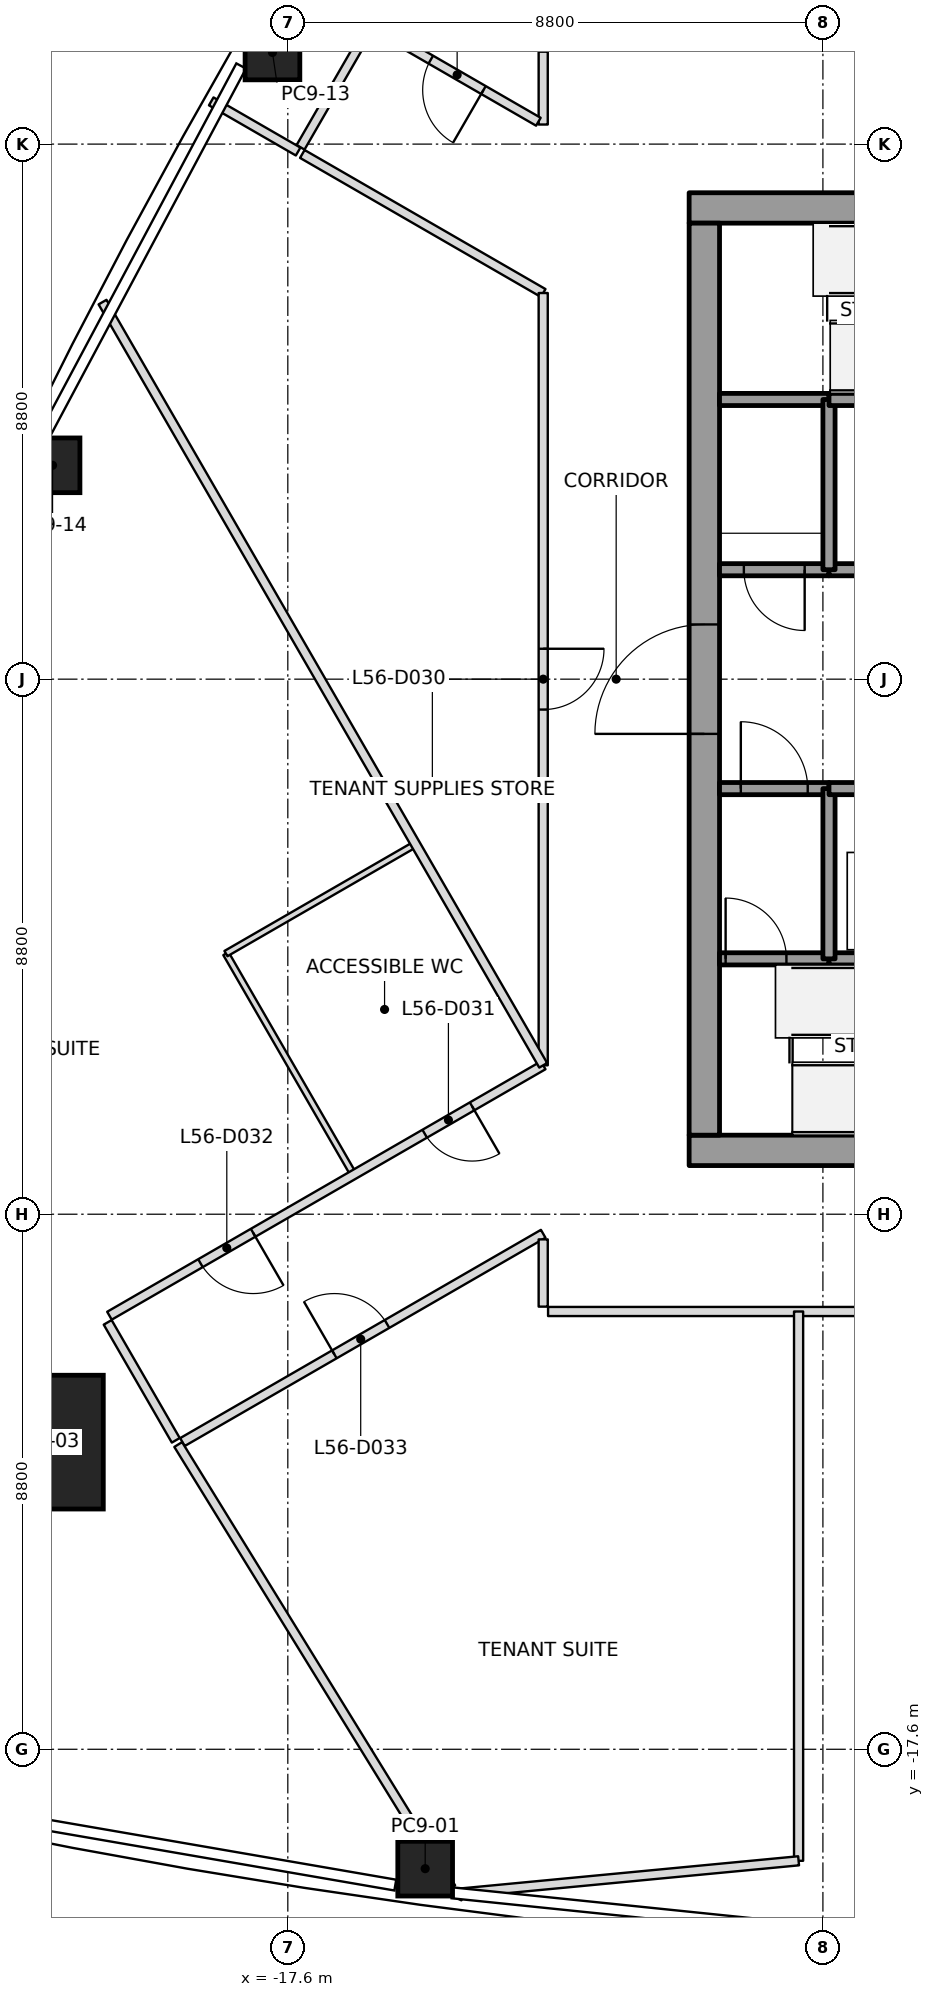
"""IFC4 building model, lengths in metres.
Left out: names, types, materials, properties, quantities, classifications, styles, units other than length and angle.
Written with IfcOpenShell. Run it as: python <this file> out.ifc"""

import sys

from ifc_helpers import new_model, si_unit, direction, frame, frame_2d, origin, origin_2d, place, context, subcontext, project, spatial, rectangle, extrude, element, fill, save


model = new_model("IFC4")
c1 = context("Model", 3, precision=1e-05, world=origin(), true_north=direction((0.0, 1.0)))
c2 = subcontext(c1, "Body", "Model", "MODEL_VIEW")
j1 = project(units=[si_unit("LENGTHUNIT", "METRE"), si_unit("PLANEANGLEUNIT", "RADIAN")], contexts=[c1])
p1 = place(None, origin())
s1 = spatial("IfcSite", under=j1, at=p1, CompositionType="ELEMENT")
p2 = place(p1, origin())
s2 = spatial("IfcBuilding", under=s1, at=p2, CompositionType="ELEMENT")
p3 = place(p2, frame((0.0, 0.0, 251.0)))
s3 = spatial("IfcBuildingStorey", under=s2, at=p3, CompositionType="ELEMENT", Elevation=251.0)
p4 = place(p3, frame((-21.735, -12.549, 0.0), z_axis=(0.027817649629, 0.016104955049, 0.999483270892), x_axis=(0.999613014306, -0.000448175434, -0.027814039075)))
e1 = element("IfcColumn", 1, at=p4, inside=s3, PredefinedType="COLUMN", context=c2, shape_type="SweptSolid", body=[
    extrude(rectangle(XDim=2.2, YDim=2.2, at=origin_2d()), origin(), (0.0, 0.0, 1.0), 4.002),
])
p5 = place(p3, frame((-15.341, -19.564, 0.0), z_axis=(0.017513449354, 0.010434842647, 0.99979217498), x_axis=(-0.990510670136, 0.136509968216, 0.015926108262)))
e2 = element("IfcColumn", 2, at=p5, inside=s3, PredefinedType="COLUMN", context=c2, shape_type="SweptSolid", body=[
    extrude(rectangle(XDim=0.9, YDim=0.9, at=origin_2d()), origin(), (0.0, 0.0, 1.0), 4.001),
])
p6 = place(p3, frame((-17.853, 10.307, 0.0), z_axis=(0.009887049298, -0.00573692984, 0.999934664812), x_axis=(0.499975560967, 0.866039512843, 2.5126546e-05)))
e3 = element("IfcColumn", 3, at=p6, inside=s3, PredefinedType="COLUMN", context=c2, shape_type="SweptSolid", body=[
    extrude(rectangle(XDim=0.9, YDim=0.9, at=origin_2d()), origin(), (0.0, 0.0, 1.0), 4.0),
])
p7 = place(p3, frame((-21.469, 3.517, 0.0), z_axis=(0.014036674448, 0.002013957638, 0.999899452818), x_axis=(0.439615277351, 0.898150723159, -0.007980376444)))
e4 = element("IfcColumn", 4, at=p7, inside=s3, PredefinedType="COLUMN", context=c2, shape_type="SweptSolid", body=[
    extrude(rectangle(XDim=0.9, YDim=0.9, at=origin_2d()), origin(), (0.0, 0.0, 1.0), 4.0),
])
p8 = place(p3, frame((-11.0, -7.75, 0.0), z_axis=(0.0, 0.0, 1.0), x_axis=(1.0, 0.0, 0.0)))
e5 = element("IfcWall", 5, at=p8, inside=s3, PredefinedType="SHEAR", context=c2, shape_type="SweptSolid", body=[
    extrude(rectangle(XDim=22.0, YDim=0.5, at=frame_2d((11.0, 0.0))), origin(), (0.0, 0.0, 1.0), 4.0),
])
p9 = place(p8, frame((10.45, 0.0, 0.0)))
e6 = element("IfcOpeningElement", 6, at=p9, cuts=e5, PredefinedType="OPENING", context=c2, shape_type="SweptSolid", body=[
    extrude(rectangle(XDim=1.1, YDim=2.1, at=frame_2d((0.55, 1.05))), frame((0.0, 0.25, 0.0), z_axis=(0.0, -1.0, 0.0), x_axis=(1.0, 0.0, 0.0)), (0.0, 0.0, 1.0), 0.5),
])
p10 = place(p3, frame((-11.0, 7.75, 0.0), z_axis=(0.0, 0.0, 1.0), x_axis=(1.0, 0.0, 0.0)))
e7 = element("IfcWall", 7, at=p10, inside=s3, PredefinedType="SHEAR", context=c2, shape_type="SweptSolid", body=[
    extrude(rectangle(XDim=22.0, YDim=0.5, at=frame_2d((11.0, 0.0))), origin(), (0.0, 0.0, 1.0), 4.0),
])
p11 = place(p10, frame((10.45, 0.0, 0.0)))
e8 = element("IfcOpeningElement", 8, at=p11, cuts=e7, PredefinedType="OPENING", context=c2, shape_type="SweptSolid", body=[
    extrude(rectangle(XDim=1.1, YDim=2.1, at=frame_2d((0.55, 1.05))), frame((0.0, 0.25, 0.0), z_axis=(0.0, -1.0, 0.0), x_axis=(1.0, 0.0, 0.0)), (0.0, 0.0, 1.0), 0.5),
])
p12 = place(p3, frame((-10.75, -7.5, 0.0), z_axis=(0.0, 0.0, 1.0), x_axis=(0.0, 1.0, 0.0)))
e9 = element("IfcWall", 9, at=p12, inside=s3, PredefinedType="SHEAR", context=c2, shape_type="SweptSolid", body=[
    extrude(rectangle(XDim=15.0, YDim=0.5, at=frame_2d((7.5, 0.0))), origin(), (0.0, 0.0, 1.0), 4.0),
])
p13 = place(p12, frame((6.6, 0.0, 0.0)))
e10 = element("IfcOpeningElement", 10, at=p13, cuts=e9, PredefinedType="OPENING", context=c2, shape_type="SweptSolid", body=[
    extrude(rectangle(XDim=1.8, YDim=2.1, at=frame_2d((0.9, 1.05))), frame((0.0, 0.25, 0.0), z_axis=(0.0, -1.0, 0.0), x_axis=(1.0, 0.0, 0.0)), (0.0, 0.0, 1.0), 0.5),
])
p14 = place(p3, frame((-10.5, -4.6, 0.0), z_axis=(0.0, 0.0, 1.0), x_axis=(1.0, 0.0, 0.0)))
e11 = element("IfcWall", 11, at=p14, inside=s3, PredefinedType="SOLIDWALL", context=c2, shape_type="SweptSolid", body=[
    extrude(rectangle(XDim=1.8, YDim=0.2, at=frame_2d((0.9, 0.0))), origin(), (0.0, 0.0, 1.0), 3.85),
])
p15 = place(p14, frame((0.1, 0.0, 0.0)))
e12 = element("IfcOpeningElement", 12, at=p15, cuts=e11, PredefinedType="OPENING", context=c2, shape_type="SweptSolid", body=[
    extrude(rectangle(XDim=1.0, YDim=2.1, at=frame_2d((0.5, 1.05))), frame((0.0, 0.1, 0.0), z_axis=(0.0, -1.0, 0.0), x_axis=(1.0, 0.0, 0.0)), (0.0, 0.0, 1.0), 0.2),
])
p16 = place(p3, frame((-10.5, -1.8, 0.0), z_axis=(0.0, 0.0, 1.0), x_axis=(1.0, 0.0, 0.0)))
e13 = element("IfcWall", 13, at=p16, inside=s3, PredefinedType="SOLIDWALL", context=c2, shape_type="SweptSolid", body=[
    extrude(rectangle(XDim=1.8, YDim=0.2, at=frame_2d((0.9, 0.0))), origin(), (0.0, 0.0, 1.0), 3.85),
])
p17 = place(p16, frame((0.35, 0.0, 0.0)))
e14 = element("IfcOpeningElement", 14, at=p17, cuts=e13, PredefinedType="OPENING", context=c2, shape_type="SweptSolid", body=[
    extrude(rectangle(XDim=1.1, YDim=2.1, at=frame_2d((0.55, 1.05))), frame((0.0, 0.1, 0.0), z_axis=(0.0, -1.0, 0.0), x_axis=(1.0, 0.0, 0.0)), (0.0, 0.0, 1.0), 0.2),
])
p18 = place(p3, frame((-8.7, 1.8, 0.0), z_axis=(0.0, 0.0, 1.0), x_axis=(-1.0, 0.0, 0.0)))
e15 = element("IfcWall", 15, at=p18, inside=s3, PredefinedType="SOLIDWALL", context=c2, shape_type="SweptSolid", body=[
    extrude(rectangle(XDim=1.8, YDim=0.2, at=frame_2d((0.9, 0.0))), origin(), (0.0, 0.0, 1.0), 3.85),
])
p19 = place(p18, frame((0.4, 0.0, 0.0)))
e16 = element("IfcOpeningElement", 16, at=p19, cuts=e15, PredefinedType="OPENING", context=c2, shape_type="SweptSolid", body=[
    extrude(rectangle(XDim=1.0, YDim=2.1, at=frame_2d((0.5, 1.05))), frame((0.0, 0.1, 0.0), z_axis=(0.0, -1.0, 0.0), x_axis=(1.0, 0.0, 0.0)), (0.0, 0.0, 1.0), 0.2),
])
p20 = place(p3, frame((-8.7, 4.6, 0.0), z_axis=(0.0, 0.0, 1.0), x_axis=(-1.0, 0.0, 0.0)))
e17 = element("IfcWall", 17, at=p20, inside=s3, PredefinedType="SOLIDWALL", context=c2, shape_type="SweptSolid", body=[
    extrude(rectangle(XDim=1.8, YDim=0.2, at=frame_2d((0.9, 0.0))), origin(), (0.0, 0.0, 1.0), 3.85),
])
p21 = place(p3, frame((-8.7, -4.6, 0.0), z_axis=(0.0, 0.0, 1.0), x_axis=(1.0, 0.0, 0.0)))
e18 = element("IfcWall", 18, at=p21, inside=s3, PredefinedType="SOLIDWALL", context=c2, shape_type="SweptSolid", body=[
    extrude(rectangle(XDim=2.6, YDim=0.2, at=frame_2d((1.3, 0.0))), origin(), (0.0, 0.0, 1.0), 3.85),
])
p22 = place(p3, frame((-8.7, -4.6, 0.0), z_axis=(0.0, 0.0, 1.0), x_axis=(0.0, 1.0, 0.0)))
e19 = element("IfcWall", 19, at=p22, inside=s3, PredefinedType="SOLIDWALL", context=c2, shape_type="SweptSolid", body=[
    extrude(rectangle(XDim=2.8, YDim=0.2, at=frame_2d((1.4, 0.0))), origin(), (0.0, 0.0, 1.0), 3.85),
])
p23 = place(p3, frame((-8.7, -1.8, 0.0), z_axis=(0.0, 0.0, 1.0), x_axis=(1.0, 0.0, 0.0)))
e20 = element("IfcWall", 20, at=p23, inside=s3, PredefinedType="SOLIDWALL", context=c2, shape_type="SweptSolid", body=[
    extrude(rectangle(XDim=2.6, YDim=0.2, at=frame_2d((1.3, 0.0))), origin(), (0.0, 0.0, 1.0), 3.85),
])
p24 = place(p23, frame((0.75, 0.0, 0.0)))
e21 = element("IfcOpeningElement", 21, at=p24, cuts=e20, PredefinedType="OPENING", context=c2, shape_type="SweptSolid", body=[
    extrude(rectangle(XDim=1.1, YDim=2.1, at=frame_2d((0.55, 1.05))), frame((0.0, 0.1, 0.0), z_axis=(0.0, -1.0, 0.0), x_axis=(1.0, 0.0, 0.0)), (0.0, 0.0, 1.0), 0.2),
])
p25 = place(p3, frame((-8.7, 1.8, 0.0), z_axis=(0.0, 0.0, 1.0), x_axis=(1.0, 0.0, 0.0)))
e22 = element("IfcWall", 22, at=p25, inside=s3, PredefinedType="SOLIDWALL", context=c2, shape_type="SweptSolid", body=[
    extrude(rectangle(XDim=5.2, YDim=0.2, at=frame_2d((2.6, 0.0))), origin(), (0.0, 0.0, 1.0), 3.85),
])
p26 = place(p25, frame((2.15, 0.0, 0.0)))
e23 = element("IfcOpeningElement", 23, at=p26, cuts=e22, PredefinedType="OPENING", context=c2, shape_type="SweptSolid", body=[
    extrude(rectangle(XDim=0.9, YDim=2.1, at=frame_2d((0.45, 1.05))), frame((0.0, 0.1, 0.0), z_axis=(0.0, -1.0, 0.0), x_axis=(1.0, 0.0, 0.0)), (0.0, 0.0, 1.0), 0.2),
])
p27 = place(p3, frame((-8.7, 4.6, 0.0), z_axis=(0.0, 0.0, 1.0), x_axis=(0.0, -1.0, 0.0)))
e24 = element("IfcWall", 24, at=p27, inside=s3, PredefinedType="SOLIDWALL", context=c2, shape_type="SweptSolid", body=[
    extrude(rectangle(XDim=2.8, YDim=0.2, at=frame_2d((1.4, 0.0))), origin(), (0.0, 0.0, 1.0), 3.85),
])
p28 = place(p3, frame((-4.3, 4.6, 0.0), z_axis=(0.0, 0.0, 1.0), x_axis=(-1.0, 0.0, 0.0)))
e25 = element("IfcWall", 25, at=p28, inside=s3, PredefinedType="SOLIDWALL", context=c2, shape_type="SweptSolid", body=[
    extrude(rectangle(XDim=4.4, YDim=0.2, at=frame_2d((2.2, 0.0))), origin(), (0.0, 0.0, 1.0), 3.85),
])
p29 = place(p3, frame((-13.4, -6.351, 0.0), z_axis=(0.0, 0.0, 1.0), x_axis=(-0.500014063744, 0.866017283926, 0.0)))
e26 = element("IfcWall", 26, at=p29, inside=s3, PredefinedType="PARTITIONING", context=c2, shape_type="SweptSolid", body=[
    extrude(rectangle(XDim=14.494, YDim=0.15, at=frame_2d((7.247, 0.0))), origin(), (0.0, 0.0, 1.0), 3.234),
])
p30 = place(p3, frame((-19.403, -12.588, 0.0), z_axis=(0.0, 0.0, 1.0), x_axis=(0.524407622251, -0.851467348596, 0.0)))
e27 = element("IfcWall", 27, at=p30, inside=s3, PredefinedType="PARTITIONING", context=c2, shape_type="SweptSolid", body=[
    extrude(rectangle(XDim=8.562, YDim=0.15, at=frame_2d((4.281, 0.0))), origin(), (0.0, 0.0, 1.0), 3.45),
])
p31 = place(p3, frame((-17.431, 8.678, 0.0), z_axis=(0.0, 0.0, 1.0), x_axis=(-0.866067297121, 0.499927431592, 0.0)))
e28 = element("IfcWall", 28, at=p31, inside=s3, PredefinedType="PARTITIONING", context=c2, shape_type="SweptSolid", body=[
    extrude(rectangle(XDim=1.65, YDim=0.15, at=frame_2d((0.825, 0.0))), origin(), (0.0, 0.0, 1.0), 3.234),
])
p32 = place(p3, frame((-9.2, -10.4, 0.0), z_axis=(0.0, 0.0, 1.0), x_axis=(0.0, -1.0, 0.0)))
e29 = element("IfcWall", 29, at=p32, inside=s3, PredefinedType="PARTITIONING", context=c2, shape_type="SweptSolid", body=[
    extrude(rectangle(XDim=9.034, YDim=0.15, at=frame_2d((4.517, 0.0))), origin(), (0.0, 0.0, 1.0), 3.45),
])
p33 = place(p3, frame((-9.2, -19.434, 0.0), z_axis=(0.0, 0.0, 1.0), x_axis=(-0.995486828172, -0.094899815256, 0.0)))
e30 = element("IfcWall", 30, at=p33, inside=s3, PredefinedType="PARTITIONING", context=c2, shape_type="SweptSolid", body=[
    extrude(rectangle(XDim=5.588, YDim=0.15, at=frame_2d((2.794, 0.0))), origin(), (0.0, 0.0, 1.0), 3.234),
])
p34 = place(p3, frame((-14.812, -20.051, 0.0), z_axis=(0.0, 0.0, 1.0), x_axis=(0.448990893469, 0.893536332547, 0.0)))
e31 = element("IfcWall", 31, at=p34, inside=s3, PredefinedType="PARTITIONING", context=c2, shape_type="SweptSolid", body=[
    extrude(rectangle(XDim=0.11, YDim=0.15, at=frame_2d((0.055, 0.0))), origin(), (0.0, 0.0, 1.0), 3.45),
])
p35 = place(p3, frame((-20.562, -10.579, 0.0), z_axis=(0.0, 0.0, 1.0), x_axis=(0.49994888933, -0.866054910533, 0.0)))
e32 = element("IfcWall", 32, at=p35, inside=s3, PredefinedType="PARTITIONING", context=c2, shape_type="SweptSolid", body=[
    extrude(rectangle(XDim=2.24, YDim=0.15, at=frame_2d((1.12, 0.0))), origin(), (0.0, 0.0, 1.0), 3.233),
])
p36 = place(p3, frame((-13.4, -6.351, 0.0), z_axis=(0.0, 0.0, 1.0), x_axis=(-0.866025662596, -0.499999551726, 0.0)))
e33 = element("IfcWall", 33, at=p36, inside=s3, PredefinedType="PARTITIONING", context=c2, shape_type="SweptSolid", body=[
    extrude(rectangle(XDim=8.237, YDim=0.15, at=frame_2d((4.118, 0.0))), origin(), (0.0, 0.0, 1.0), 3.317),
])
p37 = place(p36, frame((1.35, 0.0, 0.0)))
e34 = element("IfcOpeningElement", 34, at=p37, cuts=e33, PredefinedType="OPENING", context=c2, shape_type="SweptSolid", body=[
    extrude(rectangle(XDim=0.9, YDim=2.1, at=frame_2d((0.45, 1.05))), frame((0.0, 0.075, 0.0), z_axis=(0.0, -1.0, 0.0), x_axis=(1.0, 0.0, 0.0)), (0.0, 0.0, 1.0), 0.15),
])
p38 = place(p36, frame((5.509, 0.0, 0.0)))
e35 = element("IfcOpeningElement", 35, at=p38, cuts=e33, PredefinedType="OPENING", context=c2, shape_type="SweptSolid", body=[
    extrude(rectangle(XDim=1.0, YDim=2.1, at=frame_2d((0.5, 1.05))), frame((0.0, 0.075, 0.0), z_axis=(0.0, -1.0, 0.0), x_axis=(1.0, 0.0, 0.0)), (0.0, 0.0, 1.0), 0.15),
])
p39 = place(p3, frame((-19.333, -12.548, 0.0), z_axis=(0.0, 0.0, 1.0), x_axis=(0.866030705461, 0.499990817114, 0.0)))
e36 = element("IfcWall", 36, at=p39, inside=s3, PredefinedType="PARTITIONING", context=c2, shape_type="SweptSolid", body=[
    extrude(rectangle(XDim=6.851, YDim=0.15, at=frame_2d((3.426, 0.0))), origin(), (0.0, 0.0, 1.0), 3.233),
])
p40 = place(p39, frame((2.885, 0.0, 0.0)))
e37 = element("IfcOpeningElement", 37, at=p40, cuts=e36, PredefinedType="OPENING", context=c2, shape_type="SweptSolid", body=[
    extrude(rectangle(XDim=1.0, YDim=2.1, at=frame_2d((0.5, 1.05))), frame((0.0, 0.075, 0.0), z_axis=(0.0, -1.0, 0.0), x_axis=(1.0, 0.0, 0.0)), (0.0, 0.0, 1.0), 0.15),
])
p41 = place(p3, frame((-13.4, -9.214, 0.0), z_axis=(0.0, 0.0, 1.0), x_axis=(0.0, -1.0, 0.0)))
e38 = element("IfcWall", 38, at=p41, inside=s3, PredefinedType="PARTITIONING", context=c2, shape_type="SweptSolid", body=[
    extrude(rectangle(XDim=1.106, YDim=0.15, at=frame_2d((0.553, 0.0))), origin(), (0.0, 0.0, 1.0), 3.233),
])
p42 = place(p3, frame((-16.271, 10.687, 0.0), z_axis=(0.0, 0.0, 1.0), x_axis=(-0.500077830873, -0.865980463445, 0.0)))
e39 = element("IfcWall", 39, at=p42, inside=s3, PredefinedType="PARTITIONING", context=c2, shape_type="SweptSolid", body=[
    extrude(rectangle(XDim=2.24, YDim=0.15, at=frame_2d((1.12, 0.0))), origin(), (0.0, 0.0, 1.0), 3.45),
])
p43 = place(p3, frame((-17.361, 8.638, 0.0), z_axis=(0.0, 0.0, 1.0), x_axis=(0.866027379035, -0.49999657875, 0.0)))
e40 = element("IfcWall", 40, at=p43, inside=s3, PredefinedType="PARTITIONING", context=c2, shape_type="SweptSolid", body=[
    extrude(rectangle(XDim=4.574, YDim=0.15, at=frame_2d((2.287, 0.0))), origin(), (0.0, 0.0, 1.0), 3.45),
])
p44 = place(p3, frame((-13.4, 6.351, 0.0), z_axis=(0.0, 0.0, 1.0), x_axis=(0.0, -1.0, 0.0)))
e41 = element("IfcWall", 41, at=p44, inside=s3, PredefinedType="PARTITIONING", context=c2, shape_type="SweptSolid", body=[
    extrude(rectangle(XDim=12.702, YDim=0.15, at=frame_2d((6.351, 0.0))), origin(), (0.0, 0.0, 1.0), 3.317),
])
p45 = place(p44, frame((5.851, 0.0, 0.0)))
e42 = element("IfcOpeningElement", 42, at=p45, cuts=e41, PredefinedType="OPENING", context=c2, shape_type="SweptSolid", body=[
    extrude(rectangle(XDim=1.0, YDim=2.1, at=frame_2d((0.5, 1.05))), frame((0.0, 0.075, 0.0), z_axis=(0.0, -1.0, 0.0), x_axis=(1.0, 0.0, 0.0)), (0.0, 0.0, 1.0), 0.15),
])
p46 = place(p3, frame((-13.4, 10.32, 0.0), z_axis=(0.0, 0.0, 1.0), x_axis=(0.0, -1.0, 0.0)))
e43 = element("IfcWall", 43, at=p46, inside=s3, PredefinedType="PARTITIONING", context=c2, shape_type="SweptSolid", body=[
    extrude(rectangle(XDim=1.198, YDim=0.15, at=frame_2d((0.599, 0.0))), origin(), (0.0, 0.0, 1.0), 3.45),
])
p47 = place(p3, frame((-13.479, 9.168, 0.0), z_axis=(0.0, 0.0, 1.0), x_axis=(-0.866051688794, 0.499954470265, 0.0)))
e44 = element("IfcWall", 44, at=p47, inside=s3, PredefinedType="PARTITIONING", context=c2, shape_type="SweptSolid", body=[
    extrude(rectangle(XDim=3.097, YDim=0.15, at=frame_2d((1.548, 0.0))), origin(), (0.0, 0.0, 1.0), 3.45),
])
p48 = place(p47, frame((1.043, 0.0, 0.0)))
e45 = element("IfcOpeningElement", 45, at=p48, cuts=e44, PredefinedType="OPENING", context=c2, shape_type="SweptSolid", body=[
    extrude(rectangle(XDim=1.0, YDim=2.1, at=frame_2d((0.5, 1.05))), frame((0.0, 0.075, 0.0), z_axis=(0.0, -1.0, 0.0), x_axis=(1.0, 0.0, 0.0)), (0.0, 0.0, 1.0), 0.15),
])
p49 = place(p3, frame((-13.32, -10.4, 0.0), z_axis=(0.0, 0.0, 1.0), x_axis=(1.0, 0.0, 0.0)))
e46 = element("IfcWall", 46, at=p49, inside=s3, PredefinedType="PARTITIONING", context=c2, shape_type="SweptSolid", body=[
    extrude(rectangle(XDim=12.12, YDim=0.15, at=frame_2d((6.06, 0.0))), origin(), (0.0, 0.0, 1.0), 3.317),
])
p50 = place(p3, frame((-16.533, -8.125, 0.0), z_axis=(0.0, 0.0, 1.0), x_axis=(-0.499967396439, 0.866044226641, 0.0)))
e47 = element("IfcWall", 47, at=p50, inside=s3, PredefinedType="PARTITIONING", context=c2, shape_type="SweptSolid", body=[
    extrude(rectangle(XDim=4.17, YDim=0.1, at=frame_2d((2.085, 0.0))), origin(), (0.0, 0.0, 1.0), 3.317),
])
p51 = place(p3, frame((-18.618, -4.513, 0.0), z_axis=(0.0, 0.0, 1.0), x_axis=(0.866042098853, 0.499971082179, 0.0)))
e48 = element("IfcWall", 48, at=p51, inside=s3, PredefinedType="PARTITIONING", context=c2, shape_type="SweptSolid", body=[
    extrude(rectangle(XDim=3.57, YDim=0.1, at=frame_2d((1.785, 0.0))), origin(), (0.0, 0.0, 1.0), 3.317),
])
p52 = place(p48, origin())
e49 = element("IfcDoor", 49, at=p52, inside=s3, OperationType="SINGLE_SWING_RIGHT", PredefinedType="DOOR", context=c2, shape_type="SweptSolid", body=[
    extrude(rectangle(XDim=1.0, YDim=2.1, at=frame_2d((0.5, 1.05))), frame((0.0, 0.025, 0.0), z_axis=(0.0, -1.0, 0.0), x_axis=(1.0, 0.0, 0.0)), (0.0, 0.0, 1.0), 0.05),
])
fill(e45, e49)
p53 = place(p45, origin())
e50 = element("IfcDoor", 50, at=p53, inside=s3, OperationType="SINGLE_SWING_RIGHT", PredefinedType="DOOR", context=c2, shape_type="SweptSolid", body=[
    extrude(rectangle(XDim=1.0, YDim=2.1, at=frame_2d((0.5, 1.05))), frame((0.0, 0.025, 0.0), z_axis=(0.0, -1.0, 0.0), x_axis=(1.0, 0.0, 0.0)), (0.0, 0.0, 1.0), 0.05),
])
fill(e42, e50)
p54 = place(p37, origin())
e51 = element("IfcDoor", 51, at=p54, inside=s3, OperationType="SINGLE_SWING_RIGHT", PredefinedType="DOOR", context=c2, shape_type="SweptSolid", body=[
    extrude(rectangle(XDim=0.9, YDim=2.1, at=frame_2d((0.45, 1.05))), frame((0.0, 0.025, 0.0), z_axis=(0.0, -1.0, 0.0), x_axis=(1.0, 0.0, 0.0)), (0.0, 0.0, 1.0), 0.05),
])
fill(e34, e51)
p55 = place(p38, origin())
e52 = element("IfcDoor", 52, at=p55, inside=s3, OperationType="SINGLE_SWING_LEFT", PredefinedType="DOOR", context=c2, shape_type="SweptSolid", body=[
    extrude(rectangle(XDim=1.0, YDim=2.1, at=frame_2d((0.5, 1.05))), frame((0.0, 0.025, 0.0), z_axis=(0.0, -1.0, 0.0), x_axis=(1.0, 0.0, 0.0)), (0.0, 0.0, 1.0), 0.05),
])
fill(e35, e52)
p56 = place(p40, origin())
e53 = element("IfcDoor", 53, at=p56, inside=s3, OperationType="SINGLE_SWING_LEFT", PredefinedType="DOOR", context=c2, shape_type="SweptSolid", body=[
    extrude(rectangle(XDim=1.0, YDim=2.1, at=frame_2d((0.5, 1.05))), frame((0.0, 0.025, 0.0), z_axis=(0.0, -1.0, 0.0), x_axis=(1.0, 0.0, 0.0)), (0.0, 0.0, 1.0), 0.05),
])
fill(e37, e53)
p57 = place(p17, origin())
e54 = element("IfcDoor", 54, at=p57, inside=s3, OperationType="SINGLE_SWING_LEFT", PredefinedType="DOOR", context=c2, shape_type="SweptSolid", body=[
    extrude(rectangle(XDim=1.1, YDim=2.1, at=frame_2d((0.55, 1.05))), frame((0.0, 0.025, 0.0), z_axis=(0.0, -1.0, 0.0), x_axis=(1.0, 0.0, 0.0)), (0.0, 0.0, 1.0), 0.05),
])
fill(e14, e54)
p58 = place(p19, origin())
e55 = element("IfcDoor", 55, at=p58, inside=s3, OperationType="SINGLE_SWING_RIGHT", PredefinedType="DOOR", context=c2, shape_type="SweptSolid", body=[
    extrude(rectangle(XDim=1.0, YDim=2.1, at=frame_2d((0.5, 1.05))), frame((0.0, 0.025, 0.0), z_axis=(0.0, -1.0, 0.0), x_axis=(1.0, 0.0, 0.0)), (0.0, 0.0, 1.0), 0.05),
])
fill(e16, e55)
p59 = place(p15, origin())
e56 = element("IfcDoor", 56, at=p59, inside=s3, OperationType="SINGLE_SWING_LEFT", PredefinedType="DOOR", context=c2, shape_type="SweptSolid", body=[
    extrude(rectangle(XDim=1.0, YDim=2.1, at=frame_2d((0.5, 1.05))), frame((0.0, 0.025, 0.0), z_axis=(0.0, -1.0, 0.0), x_axis=(1.0, 0.0, 0.0)), (0.0, 0.0, 1.0), 0.05),
])
fill(e12, e56)
p60 = place(p13, origin())
e57 = element("IfcDoor", 57, at=p60, inside=s3, OperationType="DOUBLE_DOOR_SINGLE_SWING", PredefinedType="DOOR", context=c2, shape_type="SweptSolid", body=[
    extrude(rectangle(XDim=1.8, YDim=2.1, at=frame_2d((0.9, 1.05))), frame((0.0, 0.025, 0.0), z_axis=(0.0, -1.0, 0.0), x_axis=(1.0, 0.0, 0.0)), (0.0, 0.0, 1.0), 0.05),
])
fill(e10, e57)
save(model, sys.argv[1])
